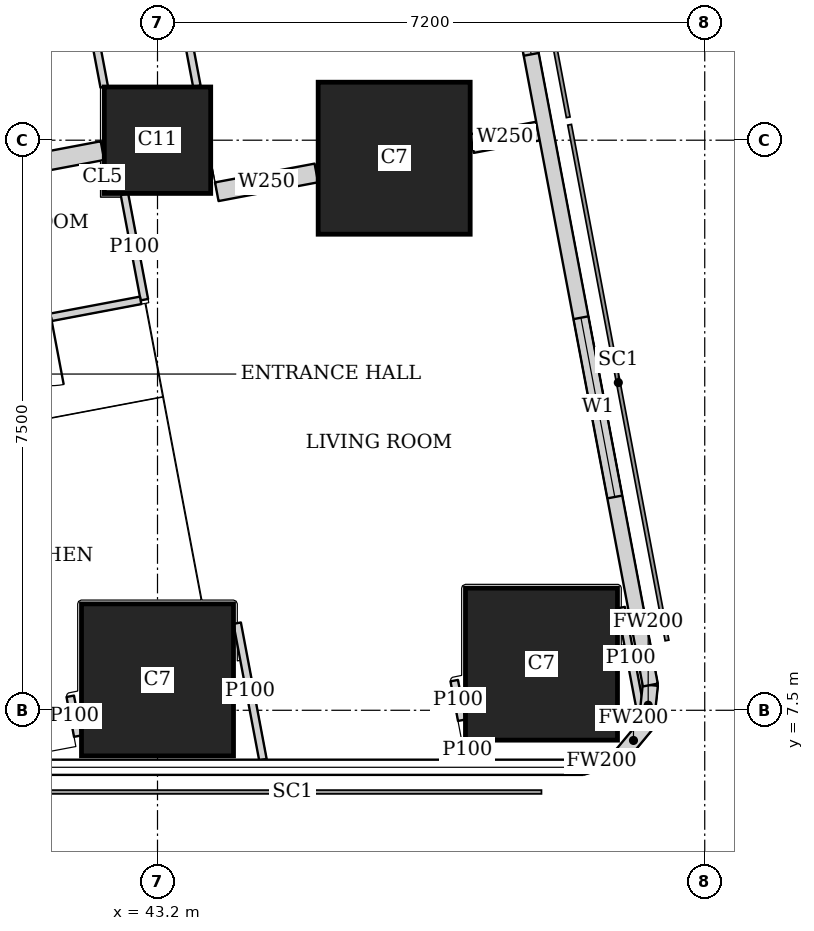
"""IFC4 building model, lengths in metres.
Left out: names, types, materials, properties, quantities, classifications, styles, units other than length and angle.
Written with IfcOpenShell. Run it as: python <this file> out.ifc"""

import sys

from ifc_helpers import new_model, si_unit, direction, frame, frame_2d, origin, origin_2d, place, context, subcontext, project, spatial, rectangle, extrude, element, fill, save


model = new_model("IFC4")
c1 = context("Model", 3, precision=1e-05, world=origin(), true_north=direction((0.0, 1.0)))
c2 = subcontext(c1, "Body", "Model", "MODEL_VIEW")
j1 = project(units=[si_unit("LENGTHUNIT", "METRE"), si_unit("PLANEANGLEUNIT", "RADIAN")], contexts=[c1])
p1 = place(None, origin())
s1 = spatial("IfcSite", under=j1, at=p1, CompositionType="ELEMENT")
p2 = place(p1, origin())
s2 = spatial("IfcBuilding", under=s1, at=p2, CompositionType="ELEMENT")
p3 = place(p2, frame((0.0, 0.0, 270.35)))
s3 = spatial("IfcBuildingStorey", under=s2, at=p3, CompositionType="ELEMENT", Elevation=270.35)
for number, where, z_axis, x_axis in (
    (1, (43.2, 7.9, 0.0), (0.0, 0.0, 1.0), (1.0, 0.0, 0.0)),
    (2, (48.252, 8.107, 0.0), (0.0, 0.0, 1.0), (1.0, 0.0, 0.0)),
):
    element("IfcColumn", number, at=place(p3, frame(where, z_axis=z_axis, x_axis=x_axis)), inside=s3, PredefinedType="COLUMN", context=c2, shape_type="SweptSolid", body=[
        extrude(rectangle(XDim=2.0, YDim=2.0, at=origin_2d()), origin(), (0.0, 0.0, 1.0), 3.75),
    ])
p4 = place(p3, frame((43.2, 15.0, 0.0), z_axis=(0.0, 0.0, 1.0), x_axis=(1.0, 0.0, 0.0)))
e3 = element("IfcColumn", 3, at=p4, inside=s3, PredefinedType="COLUMN", context=c2, shape_type="SweptSolid", body=[
    extrude(rectangle(XDim=1.4, YDim=1.4, at=origin_2d()), origin(), (0.0, 0.0, 1.0), 3.75),
])
p5 = place(p3, frame((46.314, 14.763, 0.0), z_axis=(0.0, 0.0, 1.0), x_axis=(1.0, 0.0, 0.0)))
e4 = element("IfcColumn", 4, at=p5, inside=s3, PredefinedType="COLUMN", context=c2, shape_type="SweptSolid", body=[
    extrude(rectangle(XDim=2.0, YDim=2.0, at=origin_2d()), origin(), (0.0, 0.0, 1.0), 3.75),
])
p6 = place(p3, frame((48.787, 6.75, 0.0), z_axis=(0.0, 0.0, 1.0), x_axis=(0.957282247819, 0.289155145225, 0.0)))
e5 = element("IfcWall", 5, at=p6, inside=s3, PredefinedType="SOLIDWALL", context=c2, shape_type="SweptSolid", body=[
    extrude(rectangle(XDim=0.533, YDim=0.2, at=frame_2d((0.266, 0.0))), origin(), (0.0, 0.0, 1.0), 3.5),
])
p7 = place(p3, frame((49.297, 6.904, 0.0), z_axis=(0.0, 0.0, 1.0), x_axis=(0.639255849474, 0.768994121508, 0.0)))
e6 = element("IfcWall", 6, at=p7, inside=s3, PredefinedType="SOLIDWALL", context=c2, shape_type="SweptSolid", body=[
    extrude(rectangle(XDim=0.518, YDim=0.2, at=frame_2d((0.259, 0.0))), origin(), (0.0, 0.0, 1.0), 3.5),
])
p8 = place(p3, frame((49.628, 7.302, 0.0), z_axis=(0.0, 0.0, 1.0), x_axis=(0.105352390132, 0.994434952068, 0.0)))
e7 = element("IfcWall", 7, at=p8, inside=s3, PredefinedType="SOLIDWALL", context=c2, shape_type="SweptSolid", body=[
    extrude(rectangle(XDim=0.533, YDim=0.2, at=frame_2d((0.267, 0.0))), origin(), (0.0, 0.0, 1.0), 3.5),
])
p9 = place(p3, frame((49.684, 7.832, 0.0), z_axis=(0.0, 0.0, 1.0), x_axis=(-0.185616669694, 0.982622232565, 0.0)))
e8 = element("IfcWall", 8, at=p9, inside=s3, PredefinedType="SOLIDWALL", context=c2, shape_type="SweptSolid", body=[
    extrude(rectangle(XDim=36.0, YDim=0.2, at=frame_2d((18.0, 0.0))), origin(), (0.0, 0.0, 1.0), 3.5),
])
p10 = place(p9, frame((2.518, 0.0, 0.9)))
e9 = element("IfcOpeningElement", 9, at=p10, cuts=e8, PredefinedType="OPENING", context=c2, shape_type="SweptSolid", body=[
    extrude(rectangle(XDim=2.4, YDim=1.5, at=frame_2d((1.2, 0.75))), frame((0.0, 0.11, 0.0), z_axis=(0.0, -1.0, 0.0), x_axis=(1.0, 0.0, 0.0)), (0.0, 0.0, 1.0), 0.22),
])
p11 = place(p9, frame((8.444, 0.0, 0.9)))
e10 = element("IfcOpeningElement", 10, at=p11, cuts=e8, PredefinedType="OPENING", context=c2, shape_type="SweptSolid", body=[
    extrude(rectangle(XDim=1.8, YDim=1.5, at=frame_2d((0.9, 0.75))), frame((0.0, 0.11, 0.0), z_axis=(0.0, -1.0, 0.0), x_axis=(1.0, 0.0, 0.0)), (0.0, 0.0, 1.0), 0.22),
])
p12 = place(p9, frame((12.261, 0.0, 0.9)))
e11 = element("IfcOpeningElement", 11, at=p12, cuts=e8, PredefinedType="OPENING", context=c2, shape_type="SweptSolid", body=[
    extrude(rectangle(XDim=1.8, YDim=1.5, at=frame_2d((0.9, 0.75))), frame((0.0, 0.11, 0.0), z_axis=(0.0, -1.0, 0.0), x_axis=(1.0, 0.0, 0.0)), (0.0, 0.0, 1.0), 0.22),
])
p13 = place(p9, frame((16.078, 0.0, 0.9)))
e12 = element("IfcOpeningElement", 12, at=p13, cuts=e8, PredefinedType="OPENING", context=c2, shape_type="SweptSolid", body=[
    extrude(rectangle(XDim=1.8, YDim=1.5, at=frame_2d((0.9, 0.75))), frame((0.0, 0.11, 0.0), z_axis=(0.0, -1.0, 0.0), x_axis=(1.0, 0.0, 0.0)), (0.0, 0.0, 1.0), 0.22),
])
p14 = place(p9, frame((19.894, 0.0, 0.9)))
e13 = element("IfcOpeningElement", 13, at=p14, cuts=e8, PredefinedType="OPENING", context=c2, shape_type="SweptSolid", body=[
    extrude(rectangle(XDim=1.8, YDim=1.5, at=frame_2d((0.9, 0.75))), frame((0.0, 0.11, 0.0), z_axis=(0.0, -1.0, 0.0), x_axis=(1.0, 0.0, 0.0)), (0.0, 0.0, 1.0), 0.22),
])
p15 = place(p9, frame((23.71, 0.0, 0.9)))
e14 = element("IfcOpeningElement", 14, at=p15, cuts=e8, PredefinedType="OPENING", context=c2, shape_type="SweptSolid", body=[
    extrude(rectangle(XDim=1.8, YDim=1.5, at=frame_2d((0.9, 0.75))), frame((0.0, 0.11, 0.0), z_axis=(0.0, -1.0, 0.0), x_axis=(1.0, 0.0, 0.0)), (0.0, 0.0, 1.0), 0.22),
])
p16 = place(p9, frame((27.526, 0.0, 0.9)))
e15 = element("IfcOpeningElement", 15, at=p16, cuts=e8, PredefinedType="OPENING", context=c2, shape_type="SweptSolid", body=[
    extrude(rectangle(XDim=1.8, YDim=1.5, at=frame_2d((0.9, 0.75))), frame((0.0, 0.11, 0.0), z_axis=(0.0, -1.0, 0.0), x_axis=(1.0, 0.0, 0.0)), (0.0, 0.0, 1.0), 0.22),
])
p17 = place(p9, frame((32.046, 0.0, 0.9)))
e16 = element("IfcOpeningElement", 16, at=p17, cuts=e8, PredefinedType="OPENING", context=c2, shape_type="SweptSolid", body=[
    extrude(rectangle(XDim=1.8, YDim=1.5, at=frame_2d((0.9, 0.75))), frame((0.0, 0.11, 0.0), z_axis=(0.0, -1.0, 0.0), x_axis=(1.0, 0.0, 0.0)), (0.0, 0.0, 1.0), 0.22),
])
p18 = place(p3, frame((44.248, 8.646, 0.0), z_axis=(0.0, 0.0, 1.0), x_axis=(0.185417594585, -0.982659816833, 0.0)))
e17 = element("IfcWall", 17, at=p18, inside=s3, PredefinedType="PARTITIONING", context=c2, shape_type="SweptSolid", body=[
    extrude(rectangle(XDim=1.828, YDim=0.1, at=frame_2d((0.914, 0.0))), origin(), (0.0, 0.0, 1.0), 2.05),
])
p19 = place(p3, frame((42.151, 7.16, 0.0), z_axis=(0.0, 0.0, 1.0), x_axis=(-0.185366164644, 0.982669519729, 0.0)))
e18 = element("IfcWall", 18, at=p19, inside=s3, PredefinedType="PARTITIONING", context=c2, shape_type="SweptSolid", body=[
    extrude(rectangle(XDim=0.533, YDim=0.1, at=frame_2d((0.267, 0.0))), origin(), (0.0, 0.0, 1.0), 2.5),
])
p20 = place(p3, frame((49.3, 8.851, 0.0), z_axis=(0.0, 0.0, 1.0), x_axis=(0.18581620423, -0.982584519645, 0.0)))
e19 = element("IfcWall", 19, at=p20, inside=s3, PredefinedType="PARTITIONING", context=c2, shape_type="SweptSolid", body=[
    extrude(rectangle(XDim=1.351, YDim=0.1, at=frame_2d((0.675, 0.0))), origin(), (0.0, 0.0, 1.0), 3.5),
])
p21 = place(p3, frame((47.301, 6.85, 0.0), z_axis=(0.0, 0.0, 1.0), x_axis=(-0.187513903188, 0.982261948826, 0.0)))
e20 = element("IfcWall", 20, at=p21, inside=s3, PredefinedType="PARTITIONING", context=c2, shape_type="SweptSolid", body=[
    extrude(rectangle(XDim=0.251, YDim=0.1, at=frame_2d((0.125, 0.0))), origin(), (0.0, 0.0, 1.0), 3.5),
])
p22 = place(p3, frame((47.203, 7.369, 0.0), z_axis=(0.0, 0.0, 1.0), x_axis=(-0.186456243114, 0.982463266185, 0.0)))
e21 = element("IfcWall", 21, at=p22, inside=s3, PredefinedType="PARTITIONING", context=c2, shape_type="SweptSolid", body=[
    extrude(rectangle(XDim=0.53, YDim=0.1, at=frame_2d((0.265, 0.0))), origin(), (0.0, 0.0, 1.0), 2.05),
])
p23 = place(p3, frame((42.566, 21.809, 0.0), z_axis=(0.0, 0.0, 1.0), x_axis=(0.185613526435, -0.98262282632, 0.0)))
e22 = element("IfcWall", 22, at=p23, inside=s3, PredefinedType="PARTITIONING", context=c2, shape_type="SweptSolid", body=[
    extrude(rectangle(XDim=6.207, YDim=0.1, at=frame_2d((3.104, 0.0))), origin(), (0.0, 0.0, 1.0), 2.5),
])
p24 = place(p23, frame((1.45, 0.0, 0.0)))
e23 = element("IfcOpeningElement", 23, at=p24, cuts=e22, PredefinedType="OPENING", context=c2, shape_type="SweptSolid", body=[
    extrude(rectangle(XDim=0.9, YDim=2.1, at=frame_2d((0.45, 1.05))), frame((0.0, 0.06, 0.0), z_axis=(0.0, -1.0, 0.0), x_axis=(1.0, 0.0, 0.0)), (0.0, 0.0, 1.0), 0.12),
])
p25 = place(p23, frame((4.163, 0.0, 0.0)))
e24 = element("IfcOpeningElement", 24, at=p25, cuts=e22, PredefinedType="OPENING", context=c2, shape_type="SweptSolid", body=[
    extrude(rectangle(XDim=0.9, YDim=2.1, at=frame_2d((0.45, 1.05))), frame((0.0, 0.06, 0.0), z_axis=(0.0, -1.0, 0.0), x_axis=(1.0, 0.0, 0.0)), (0.0, 0.0, 1.0), 0.12),
])
p26 = place(p3, frame((41.414, 21.442, 0.0), z_axis=(0.0, 0.0, 1.0), x_axis=(0.185698675093, -0.982606738257, 0.0)))
e25 = element("IfcWall", 25, at=p26, inside=s3, PredefinedType="PARTITIONING", context=c2, shape_type="SweptSolid", body=[
    extrude(rectangle(XDim=5.843, YDim=0.1, at=frame_2d((2.921, 0.0))), origin(), (0.0, 0.0, 1.0), 3.5),
])
p27 = place(p26, frame((0.655, 0.0, 0.0)))
e26 = element("IfcOpeningElement", 26, at=p27, cuts=e25, PredefinedType="OPENING", context=c2, shape_type="SweptSolid", body=[
    extrude(rectangle(XDim=0.9, YDim=2.1, at=frame_2d((0.45, 1.05))), frame((0.0, 0.06, 0.0), z_axis=(0.0, -1.0, 0.0), x_axis=(1.0, 0.0, 0.0)), (0.0, 0.0, 1.0), 0.12),
])
p28 = place(p26, frame((2.563, 0.0, 0.0)))
e27 = element("IfcOpeningElement", 27, at=p28, cuts=e25, PredefinedType="OPENING", context=c2, shape_type="SweptSolid", body=[
    extrude(rectangle(XDim=0.9, YDim=2.1, at=frame_2d((0.45, 1.05))), frame((0.0, 0.06, 0.0), z_axis=(0.0, -1.0, 0.0), x_axis=(1.0, 0.0, 0.0)), (0.0, 0.0, 1.0), 0.12),
])
p29 = place(p3, frame((42.765, 14.29, 0.0), z_axis=(0.0, 0.0, 1.0), x_axis=(0.185634589628, -0.982618847333, 0.0)))
e28 = element("IfcWall", 28, at=p29, inside=s3, PredefinedType="PARTITIONING", context=c2, shape_type="SweptSolid", body=[
    extrude(rectangle(XDim=1.413, YDim=0.1, at=frame_2d((0.706, 0.0))), origin(), (0.0, 0.0, 1.0), 3.5),
])
p30 = place(p3, frame((42.978, 12.893, 0.0), z_axis=(0.0, 0.0, 1.0), x_axis=(-0.982607026909, -0.185697147715, 0.0)))
e29 = element("IfcWall", 29, at=p30, inside=s3, PredefinedType="PARTITIONING", context=c2, shape_type="SweptSolid", body=[
    extrude(rectangle(XDim=3.275, YDim=0.1, at=frame_2d((1.637, 0.0))), origin(), (0.0, 0.0, 1.0), 3.5),
])
p31 = place(p30, frame((1.2, 0.0, 0.0)))
e30 = element("IfcOpeningElement", 30, at=p31, cuts=e29, PredefinedType="OPENING", context=c2, shape_type="SweptSolid", body=[
    extrude(rectangle(XDim=0.9, YDim=2.1, at=frame_2d((0.45, 1.05))), frame((0.0, 0.06, 0.0), z_axis=(0.0, -1.0, 0.0), x_axis=(1.0, 0.0, 0.0)), (0.0, 0.0, 1.0), 0.12),
])
p32 = place(p3, frame((48.206, 15.12, 0.0), z_axis=(0.0, 0.0, 1.0), x_axis=(-0.982608419258, -0.185689780017, 0.0)))
e31 = element("IfcWall", 31, at=p32, inside=s3, PredefinedType="SOLIDWALL", context=c2, shape_type="SweptSolid", body=[
    extrude(rectangle(XDim=0.884, YDim=0.25, at=frame_2d((0.442, 0.0))), origin(), (0.0, 0.0, 1.0), 3.5),
])
p33 = place(p3, frame((45.29, 14.569, 0.0), z_axis=(0.0, 0.0, 1.0), x_axis=(-0.982676759201, -0.185327782391, 0.0)))
e32 = element("IfcWall", 32, at=p33, inside=s3, PredefinedType="SOLIDWALL", context=c2, shape_type="SweptSolid", body=[
    extrude(rectangle(XDim=1.333, YDim=0.25, at=frame_2d((0.667, 0.0))), origin(), (0.0, 0.0, 1.0), 3.5),
])
p34 = place(p3, frame((42.476, 14.863, 0.0), z_axis=(0.0, 0.0, 1.0), x_axis=(-0.982638716117, -0.185529387398, 0.0)))
e33 = element("IfcWall", 33, at=p34, inside=s3, PredefinedType="SOLIDWALL", context=c2, shape_type="SweptSolid", body=[
    extrude(rectangle(XDim=3.148, YDim=0.25, at=frame_2d((1.574, 0.0))), origin(), (0.0, 0.0, 1.0), 3.5),
])
p35 = place(p10, origin())
e34 = element("IfcWindow", 34, at=p35, inside=s3, PartitioningType="SINGLE_PANEL", PredefinedType="WINDOW", context=c2, shape_type="SweptSolid", body=[
    extrude(rectangle(XDim=2.4, YDim=1.5, at=frame_2d((1.2, 0.75))), frame((0.0, 0.03, 0.0), z_axis=(0.0, -1.0, 0.0), x_axis=(1.0, 0.0, 0.0)), (0.0, 0.0, 1.0), 0.06),
])
fill(e9, e34)
p36 = place(p11, origin())
e35 = element("IfcWindow", 35, at=p36, inside=s3, PartitioningType="SINGLE_PANEL", PredefinedType="WINDOW", context=c2, shape_type="SweptSolid", body=[
    extrude(rectangle(XDim=1.8, YDim=1.5, at=frame_2d((0.9, 0.75))), frame((0.0, 0.03, 0.0), z_axis=(0.0, -1.0, 0.0), x_axis=(1.0, 0.0, 0.0)), (0.0, 0.0, 1.0), 0.06),
])
fill(e10, e35)
save(model, sys.argv[1])
